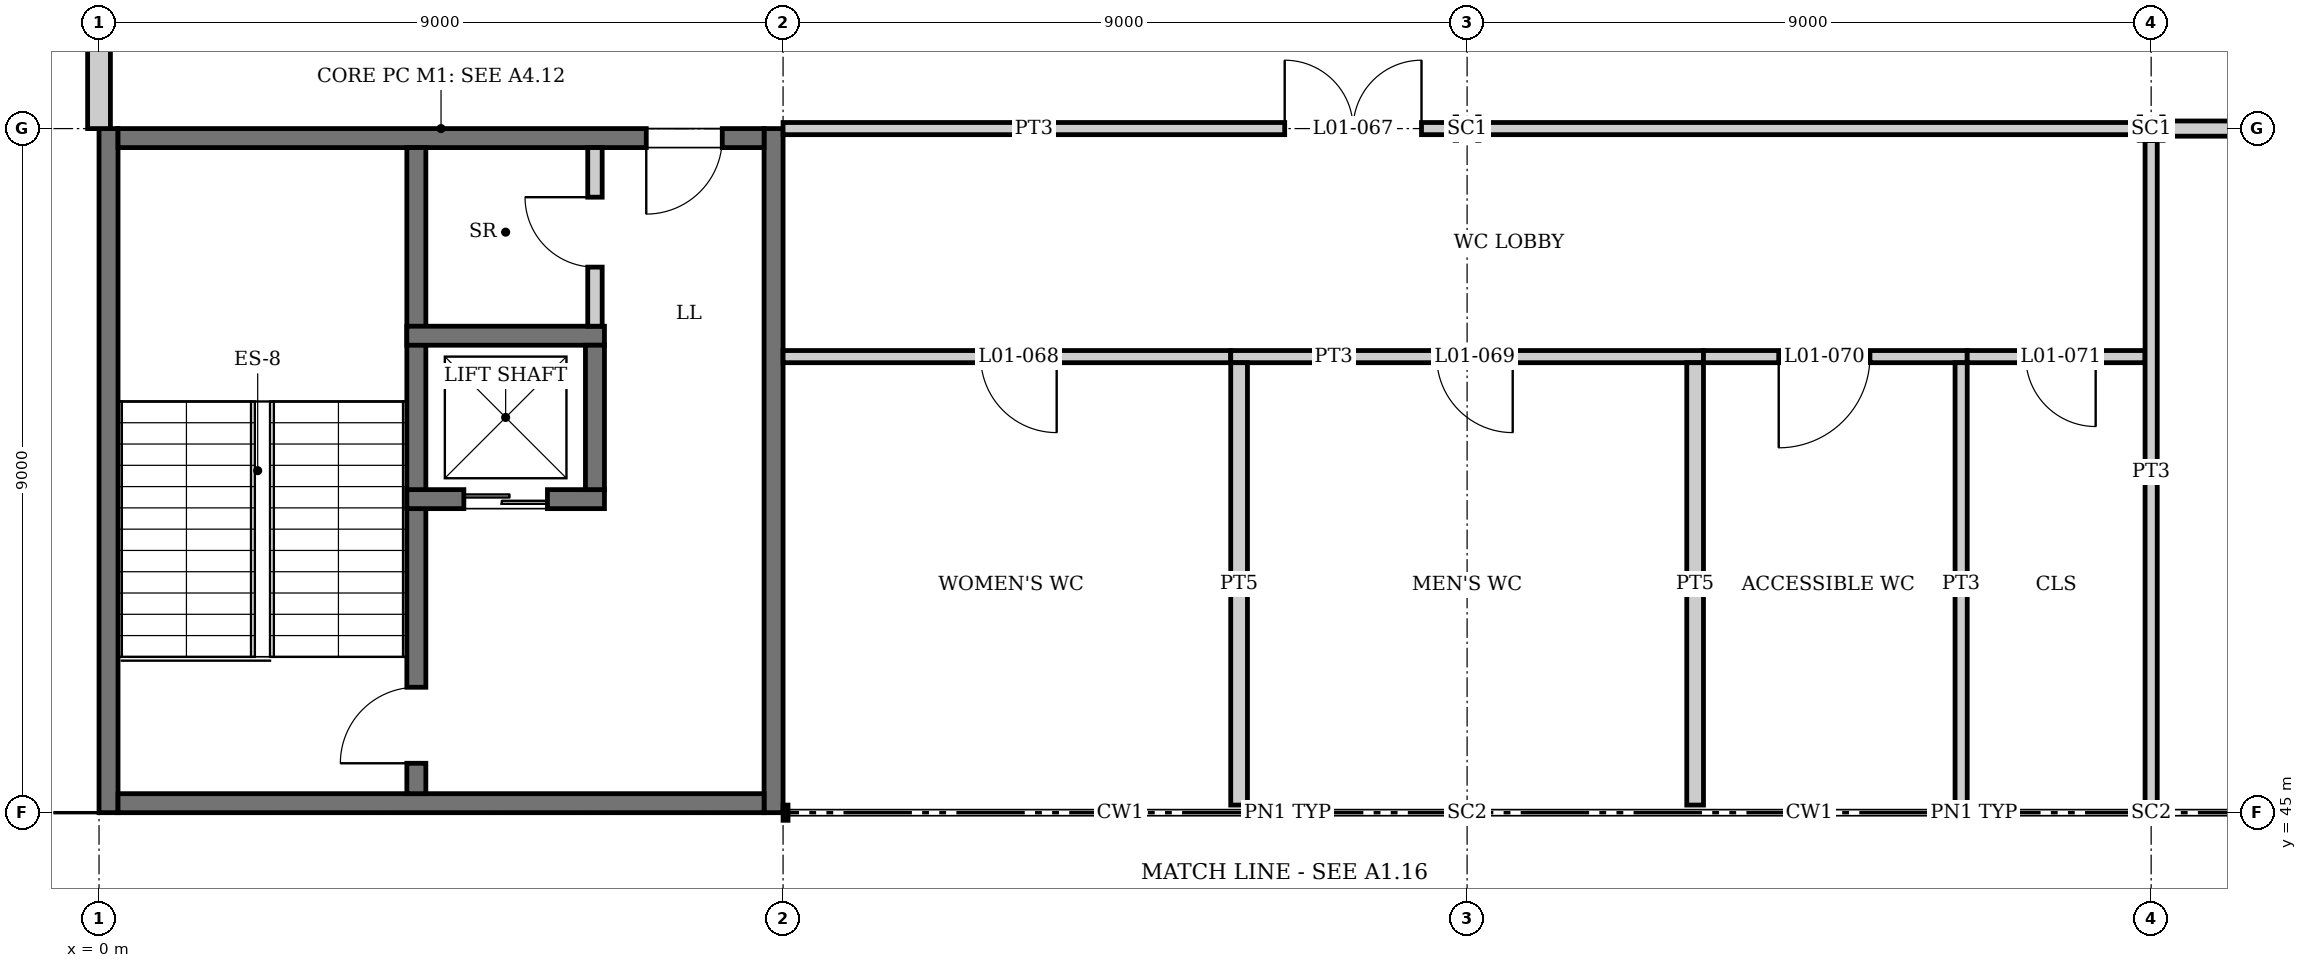
"""IFC4 building model, lengths in metres.
Left out: names, types, materials, properties, quantities, classifications, styles, units other than length and angle.
Written with IfcOpenShell. Run it as: python <this file> out.ifc"""

import sys

from ifc_helpers import new_model, si_unit, direction, frame, frame_2d, origin, origin_2d, place, context, subcontext, project, spatial, rectangle, i_section, extrude, element, fill, save


model = new_model("IFC4")
c1 = context("Model", 3, precision=1e-05, world=origin(), true_north=direction((0.0, 1.0)))
c2 = subcontext(c1, "Body", "Model", "MODEL_VIEW")
j1 = project(units=[si_unit("LENGTHUNIT", "METRE"), si_unit("PLANEANGLEUNIT", "RADIAN")], contexts=[c1])
p1 = place(None, origin())
s1 = spatial("IfcSite", under=j1, at=p1, CompositionType="ELEMENT")
p2 = place(p1, origin())
s2 = spatial("IfcBuilding", under=s1, at=p2, CompositionType="ELEMENT")
p3 = place(p2, frame((0.0, 0.0, 6.0)))
s3 = spatial("IfcBuildingStorey", under=s2, at=p3, CompositionType="ELEMENT", Elevation=6.0)
p4 = place(p3, frame((18.0, 45.0, 0.0), z_axis=(0.0, 0.0, 1.0), x_axis=(0.0, 1.0, 0.0)))
e1 = element("IfcColumn", 1, at=p4, inside=s3, PredefinedType="COLUMN", context=c2, shape_type="SweptSolid", body=[
    extrude(i_section(OverallWidth=0.256, OverallDepth=0.26, WebThickness=0.01, FlangeThickness=0.017, at=origin_2d()), origin(), (0.0, 0.0, 1.0), 4.5),
])
p5 = place(p3, frame((18.0, 54.0, 0.0), z_axis=(0.0, 0.0, 1.0), x_axis=(0.0, 1.0, 0.0)))
e2 = element("IfcColumn", 2, at=p5, inside=s3, PredefinedType="COLUMN", context=c2, shape_type="SweptSolid", body=[
    extrude(i_section(OverallWidth=0.307, OverallDepth=0.315, WebThickness=0.012, FlangeThickness=0.019, at=origin_2d()), origin(), (0.0, 0.0, 1.0), 4.5),
])
p6 = place(p3, frame((27.0, 45.0, 0.0), z_axis=(0.0, 0.0, 1.0), x_axis=(0.0, 1.0, 0.0)))
e3 = element("IfcColumn", 3, at=p6, inside=s3, PredefinedType="COLUMN", context=c2, shape_type="SweptSolid", body=[
    extrude(i_section(OverallWidth=0.256, OverallDepth=0.26, WebThickness=0.01, FlangeThickness=0.017, at=origin_2d()), origin(), (0.0, 0.0, 1.0), 4.5),
])
p7 = place(p3, frame((27.0, 54.0, 0.0), z_axis=(0.0, 0.0, 1.0), x_axis=(0.0, 1.0, 0.0)))
e4 = element("IfcColumn", 4, at=p7, inside=s3, PredefinedType="COLUMN", context=c2, shape_type="SweptSolid", body=[
    extrude(i_section(OverallWidth=0.307, OverallDepth=0.315, WebThickness=0.012, FlangeThickness=0.019, at=origin_2d()), origin(), (0.0, 0.0, 1.0), 4.5),
])
for number, where, z_axis, x_axis in (
    (5, (0.125, 45.0, 0.0), (0.0, 0.0, 1.0), (0.0, 1.0, 0.0)),
    (6, (8.875, 45.0, 0.0), (0.0, 0.0, 1.0), (0.0, 1.0, 0.0)),
):
    element("IfcWall", number, at=place(p3, frame(where, z_axis=z_axis, x_axis=x_axis)), inside=s3, PredefinedType="SHEAR", context=c2, shape_type="SweptSolid", body=[
        extrude(rectangle(XDim=9.0, YDim=0.25, at=frame_2d((4.5, 0.0))), origin(), (0.0, 0.0, 1.0), 4.5),
    ])
p8 = place(p3, frame((0.25, 45.125, 0.0), z_axis=(0.0, 0.0, 1.0), x_axis=(1.0, 0.0, 0.0)))
e7 = element("IfcWall", 7, at=p8, inside=s3, PredefinedType="SHEAR", context=c2, shape_type="SweptSolid", body=[
    extrude(rectangle(XDim=8.5, YDim=0.25, at=frame_2d((4.25, 0.0))), origin(), (0.0, 0.0, 1.0), 4.5),
])
p9 = place(p3, frame((0.25, 53.875, 0.0), z_axis=(0.0, 0.0, 1.0), x_axis=(1.0, 0.0, 0.0)))
e8 = element("IfcWall", 8, at=p9, inside=s3, PredefinedType="SHEAR", context=c2, shape_type="SweptSolid", body=[
    extrude(rectangle(XDim=8.5, YDim=0.25, at=frame_2d((4.25, 0.0))), origin(), (0.0, 0.0, 1.0), 4.5),
])
p10 = place(p9, frame((6.95, 0.0, 0.0)))
e9 = element("IfcOpeningElement", 9, at=p10, cuts=e8, PredefinedType="OPENING", context=c2, shape_type="SweptSolid", body=[
    extrude(rectangle(XDim=1.0, YDim=2.1, at=frame_2d((0.5, 1.05))), frame((0.0, 0.135, 0.0), z_axis=(0.0, -1.0, 0.0), x_axis=(1.0, 0.0, 0.0)), (0.0, 0.0, 1.0), 0.27),
])
p11 = place(p3, frame((0.0, 54.0, 0.0), z_axis=(0.0, 0.0, 1.0), x_axis=(0.0, 1.0, 0.0)))
e10 = element("IfcWall", 10, at=p11, inside=s3, PredefinedType="SOLIDWALL", context=c2, shape_type="SweptSolid", body=[
    extrude(rectangle(XDim=8.872, YDim=0.3, at=frame_2d((4.436, 0.0))), origin(), (0.0, 0.0, 1.0), 3.947),
])
p12 = place(p11, frame((1.8, 0.0, 0.6)))
e11 = element("IfcOpeningElement", 11, at=p12, cuts=e10, PredefinedType="OPENING", context=c2, shape_type="SweptSolid", body=[
    extrude(rectangle(XDim=0.9, YDim=2.7, at=frame_2d((0.45, 1.35))), frame((0.0, 0.16, 0.0), z_axis=(0.0, -1.0, 0.0), x_axis=(1.0, 0.0, 0.0)), (0.0, 0.0, 1.0), 0.32),
])
p13 = place(p11, frame((5.55, 0.0, 0.9)))
e12 = element("IfcOpeningElement", 12, at=p13, cuts=e10, PredefinedType="OPENING", context=c2, shape_type="SweptSolid", body=[
    extrude(rectangle(XDim=2.4, YDim=2.1, at=frame_2d((1.2, 1.05))), frame((0.0, 0.16, 0.0), z_axis=(0.0, -1.0, 0.0), x_axis=(1.0, 0.0, 0.0)), (0.0, 0.0, 1.0), 0.32),
])
p14 = place(p3, frame((4.175, 45.25, 0.0), z_axis=(0.0, 0.0, 1.0), x_axis=(0.0, 1.0, 0.0)))
e13 = element("IfcWall", 13, at=p14, inside=s3, PredefinedType="SOLIDWALL", context=c2, shape_type="SweptSolid", body=[
    extrude(rectangle(XDim=8.5, YDim=0.25, at=frame_2d((4.25, 0.0))), origin(), (0.0, 0.0, 1.0), 4.25),
])
p15 = place(p14, frame((0.4, 0.0, 0.0)))
e14 = element("IfcOpeningElement", 14, at=p15, cuts=e13, PredefinedType="OPENING", context=c2, shape_type="SweptSolid", body=[
    extrude(rectangle(XDim=1.0, YDim=2.1, at=frame_2d((0.5, 1.05))), frame((0.0, 0.135, 0.0), z_axis=(0.0, -1.0, 0.0), x_axis=(1.0, 0.0, 0.0)), (0.0, 0.0, 1.0), 0.27),
])
p16 = place(p3, frame((4.05, 49.125, 0.0), z_axis=(0.0, 0.0, 1.0), x_axis=(1.0, 0.0, 0.0)))
e15 = element("IfcWall", 15, at=p16, inside=s3, PredefinedType="SOLIDWALL", context=c2, shape_type="SweptSolid", body=[
    extrude(rectangle(XDim=2.6, YDim=0.25, at=frame_2d((1.3, 0.0))), origin(), (0.0, 0.0, 1.0), 4.5),
])
p17 = place(p16, frame((0.75, 0.0, 0.0)))
e16 = element("IfcOpeningElement", 16, at=p17, cuts=e15, PredefinedType="OPENING", context=c2, shape_type="SweptSolid", body=[
    extrude(rectangle(XDim=1.1, YDim=2.1, at=frame_2d((0.55, 1.05))), frame((0.0, 0.135, 0.0), z_axis=(0.0, -1.0, 0.0), x_axis=(1.0, 0.0, 0.0)), (0.0, 0.0, 1.0), 0.27),
])
p18 = place(p3, frame((4.05, 51.275, 0.0), z_axis=(0.0, 0.0, 1.0), x_axis=(1.0, 0.0, 0.0)))
e17 = element("IfcWall", 17, at=p18, inside=s3, PredefinedType="SOLIDWALL", context=c2, shape_type="SweptSolid", body=[
    extrude(rectangle(XDim=2.6, YDim=0.25, at=frame_2d((1.3, 0.0))), origin(), (0.0, 0.0, 1.0), 4.5),
])
p19 = place(p3, frame((6.525, 49.25, 0.0), z_axis=(0.0, 0.0, 1.0), x_axis=(0.0, 1.0, 0.0)))
e18 = element("IfcWall", 18, at=p19, inside=s3, PredefinedType="SOLIDWALL", context=c2, shape_type="SweptSolid", body=[
    extrude(rectangle(XDim=1.9, YDim=0.25, at=frame_2d((0.95, 0.0))), origin(), (0.0, 0.0, 1.0), 4.5),
])
p20 = place(p3, frame((9.0, 51.0, 0.0), z_axis=(0.0, 0.0, 1.0), x_axis=(1.0, 0.0, 0.0)))
e19 = element("IfcWall", 19, at=p20, inside=s3, PredefinedType="PARTITIONING", context=c2, shape_type="SweptSolid", body=[
    extrude(rectangle(XDim=5.89, YDim=0.16, at=frame_2d((2.945, 0.0))), origin(), (0.0, 0.0, 1.0), 3.994),
])
p21 = place(p20, frame((2.6, 0.0, 0.0)))
e20 = element("IfcOpeningElement", 20, at=p21, cuts=e19, PredefinedType="OPENING", context=c2, shape_type="SweptSolid", body=[
    extrude(rectangle(XDim=1.0, YDim=2.1, at=frame_2d((0.5, 1.05))), frame((0.0, 0.09, 0.0), z_axis=(0.0, -1.0, 0.0), x_axis=(1.0, 0.0, 0.0)), (0.0, 0.0, 1.0), 0.18),
])
p22 = place(p3, frame((14.89, 51.0, 0.0), z_axis=(0.0, 0.0, 1.0), x_axis=(1.0, 0.0, 0.0)))
e21 = element("IfcWall", 21, at=p22, inside=s3, PredefinedType="PARTITIONING", context=c2, shape_type="SweptSolid", body=[
    extrude(rectangle(XDim=6.22, YDim=0.16, at=frame_2d((3.11, 0.0))), origin(), (0.0, 0.0, 1.0), 3.947),
])
p23 = place(p22, frame((2.71, 0.0, 0.0)))
e22 = element("IfcOpeningElement", 22, at=p23, cuts=e21, PredefinedType="OPENING", context=c2, shape_type="SweptSolid", body=[
    extrude(rectangle(XDim=1.0, YDim=2.1, at=frame_2d((0.5, 1.05))), frame((0.0, 0.09, 0.0), z_axis=(0.0, -1.0, 0.0), x_axis=(1.0, 0.0, 0.0)), (0.0, 0.0, 1.0), 0.18),
])
p24 = place(p3, frame((21.11, 51.0, 0.0), z_axis=(0.0, 0.0, 1.0), x_axis=(1.0, 0.0, 0.0)))
e23 = element("IfcWall", 23, at=p24, inside=s3, PredefinedType="PARTITIONING", context=c2, shape_type="SweptSolid", body=[
    extrude(rectangle(XDim=3.47, YDim=0.16, at=frame_2d((1.735, 0.0))), origin(), (0.0, 0.0, 1.0), 3.994),
])
p25 = place(p24, frame((0.99, 0.0, 0.0)))
e24 = element("IfcOpeningElement", 24, at=p25, cuts=e23, PredefinedType="OPENING", context=c2, shape_type="SweptSolid", body=[
    extrude(rectangle(XDim=1.2, YDim=2.1, at=frame_2d((0.6, 1.05))), frame((0.0, 0.09, 0.0), z_axis=(0.0, -1.0, 0.0), x_axis=(1.0, 0.0, 0.0)), (0.0, 0.0, 1.0), 0.18),
])
p26 = place(p3, frame((24.58, 51.0, 0.0), z_axis=(0.0, 0.0, 1.0), x_axis=(1.0, 0.0, 0.0)))
e25 = element("IfcWall", 25, at=p26, inside=s3, PredefinedType="PARTITIONING", context=c2, shape_type="SweptSolid", body=[
    extrude(rectangle(XDim=2.34, YDim=0.16, at=frame_2d((1.17, 0.0))), origin(), (0.0, 0.0, 1.0), 3.947),
])
p27 = place(p26, frame((0.77, 0.0, 0.0)))
e26 = element("IfcOpeningElement", 26, at=p27, cuts=e25, PredefinedType="OPENING", context=c2, shape_type="SweptSolid", body=[
    extrude(rectangle(XDim=0.92, YDim=2.1, at=frame_2d((0.46, 1.05))), frame((0.0, 0.09, 0.0), z_axis=(0.0, -1.0, 0.0), x_axis=(1.0, 0.0, 0.0)), (0.0, 0.0, 1.0), 0.18),
])
p28 = place(p3, frame((9.0, 54.0, 0.0), z_axis=(0.0, 0.0, 1.0), x_axis=(1.0, 0.0, 0.0)))
e27 = element("IfcWall", 27, at=p28, inside=s3, PredefinedType="PARTITIONING", context=c2, shape_type="SweptSolid", body=[
    extrude(rectangle(XDim=8.843, YDim=0.16, at=frame_2d((4.421, 0.0))), origin(), (0.0, 0.0, 1.0), 3.822),
])
p29 = place(p28, frame((6.6, 0.0, 0.0)))
e28 = element("IfcOpeningElement", 28, at=p29, cuts=e27, PredefinedType="OPENING", context=c2, shape_type="SweptSolid", body=[
    extrude(rectangle(XDim=1.8, YDim=2.1, at=frame_2d((0.9, 1.05))), frame((0.0, 0.09, 0.0), z_axis=(0.0, -1.0, 0.0), x_axis=(1.0, 0.0, 0.0)), (0.0, 0.0, 1.0), 0.18),
])
p30 = place(p3, frame((18.157, 54.0, 0.0), z_axis=(0.0, 0.0, 1.0), x_axis=(1.0, 0.0, 0.0)))
e29 = element("IfcWall", 29, at=p30, inside=s3, PredefinedType="PARTITIONING", context=c2, shape_type="SweptSolid", body=[
    extrude(rectangle(XDim=8.685, YDim=0.16, at=frame_2d((4.343, 0.0))), origin(), (0.0, 0.0, 1.0), 3.822),
])
p31 = place(p3, frame((27.157, 54.0, 0.0), z_axis=(0.0, 0.0, 1.0), x_axis=(1.0, 0.0, 0.0)))
e30 = element("IfcWall", 30, at=p31, inside=s3, PredefinedType="PARTITIONING", context=c2, shape_type="SweptSolid", body=[
    extrude(rectangle(XDim=8.685, YDim=0.2, at=frame_2d((4.343, 0.0))), origin(), (0.0, 0.0, 1.0), 3.822),
])
p32 = place(p31, frame((3.942, 0.0, 0.0)))
e31 = element("IfcOpeningElement", 31, at=p32, cuts=e30, PredefinedType="OPENING", context=c2, shape_type="SweptSolid", body=[
    extrude(rectangle(XDim=1.0, YDim=2.1, at=frame_2d((0.5, 1.05))), frame((0.0, 0.11, 0.0), z_axis=(0.0, -1.0, 0.0), x_axis=(1.0, 0.0, 0.0)), (0.0, 0.0, 1.0), 0.22),
])
p33 = place(p3, frame((6.525, 51.4, 0.0), z_axis=(0.0, 0.0, 1.0), x_axis=(0.0, 1.0, 0.0)))
e32 = element("IfcWall", 32, at=p33, inside=s3, PredefinedType="PARTITIONING", context=c2, shape_type="SweptSolid", body=[
    extrude(rectangle(XDim=2.35, YDim=0.19, at=frame_2d((1.175, 0.0))), origin(), (0.0, 0.0, 1.0), 4.25),
])
p34 = place(p33, frame((0.778, 0.0, 0.0)))
e33 = element("IfcOpeningElement", 33, at=p34, cuts=e32, PredefinedType="OPENING", context=c2, shape_type="SweptSolid", body=[
    extrude(rectangle(XDim=0.92, YDim=2.1, at=frame_2d((0.46, 1.05))), frame((0.0, 0.105, 0.0), z_axis=(0.0, -1.0, 0.0), x_axis=(1.0, 0.0, 0.0)), (0.0, 0.0, 1.0), 0.21),
])
for number, where, z_axis, x_axis in (
    (34, (15.0, 45.1, 0.0), (0.0, 0.0, 1.0), (0.0, 1.0, 0.0)),
    (35, (21.0, 45.1, 0.0), (0.0, 0.0, 1.0), (0.0, 1.0, 0.0)),
):
    element("IfcWall", number, at=place(p3, frame(where, z_axis=z_axis, x_axis=x_axis)), inside=s3, PredefinedType="PLUMBINGWALL", context=c2, shape_type="SweptSolid", body=[
        extrude(rectangle(XDim=5.82, YDim=0.22, at=frame_2d((2.91, 0.0))), origin(), (0.0, 0.0, 1.0), 4.35),
    ])
p35 = place(p3, frame((24.5, 45.1, 0.0), z_axis=(0.0, 0.0, 1.0), x_axis=(0.0, 1.0, 0.0)))
e36 = element("IfcWall", 36, at=p35, inside=s3, PredefinedType="PARTITIONING", context=c2, shape_type="SweptSolid", body=[
    extrude(rectangle(XDim=5.82, YDim=0.16, at=frame_2d((2.91, 0.0))), origin(), (0.0, 0.0, 1.0), 4.35),
])
p36 = place(p3, frame((27.0, 45.13, 0.0), z_axis=(0.0, 0.0, 1.0), x_axis=(0.0, 1.0, 0.0)))
e37 = element("IfcWall", 37, at=p36, inside=s3, PredefinedType="PARTITIONING", context=c2, shape_type="SweptSolid", body=[
    extrude(rectangle(XDim=8.713, YDim=0.16, at=frame_2d((4.356, 0.0))), origin(), (0.0, 0.0, 1.0), 3.947),
])
p37 = place(p17, origin())
e38 = element("IfcDoor", 38, at=p37, inside=s3, OperationType="DOUBLE_DOOR_SLIDING", PredefinedType="DOOR", context=c2, shape_type="SweptSolid", body=[
    extrude(rectangle(XDim=1.1, YDim=2.1, at=frame_2d((0.55, 1.05))), frame((0.0, 0.025, 0.0), z_axis=(0.0, -1.0, 0.0), x_axis=(1.0, 0.0, 0.0)), (0.0, 0.0, 1.0), 0.05),
])
fill(e16, e38)
p38 = place(p15, origin())
e39 = element("IfcDoor", 39, at=p38, inside=s3, OperationType="SINGLE_SWING_LEFT", PredefinedType="DOOR", context=c2, shape_type="SweptSolid", body=[
    extrude(rectangle(XDim=1.0, YDim=2.1, at=frame_2d((0.5, 1.05))), frame((0.0, 0.025, 0.0), z_axis=(0.0, -1.0, 0.0), x_axis=(1.0, 0.0, 0.0)), (0.0, 0.0, 1.0), 0.05),
])
fill(e14, e39)
p39 = place(p10, frame((1.0, 0.0, 0.0), z_axis=(0.0, 0.0, 1.0), x_axis=(-1.0, 0.0, 0.0)))
e40 = element("IfcDoor", 40, at=p39, inside=s3, OperationType="SINGLE_SWING_RIGHT", PredefinedType="DOOR", context=c2, shape_type="SweptSolid", body=[
    extrude(rectangle(XDim=1.0, YDim=2.1, at=frame_2d((0.5, 1.05))), frame((0.0, 0.025, 0.0), z_axis=(0.0, -1.0, 0.0), x_axis=(1.0, 0.0, 0.0)), (0.0, 0.0, 1.0), 0.05),
])
fill(e9, e40)
p40 = place(p34, origin())
e41 = element("IfcDoor", 41, at=p40, inside=s3, OperationType="SINGLE_SWING_RIGHT", PredefinedType="DOOR", context=c2, shape_type="SweptSolid", body=[
    extrude(rectangle(XDim=0.92, YDim=2.1, at=frame_2d((0.46, 1.05))), frame((0.0, 0.025, 0.0), z_axis=(0.0, -1.0, 0.0), x_axis=(1.0, 0.0, 0.0)), (0.0, 0.0, 1.0), 0.05),
])
fill(e33, e41)
p41 = place(p29, origin())
e42 = element("IfcDoor", 42, at=p41, inside=s3, OperationType="DOUBLE_DOOR_SINGLE_SWING", PredefinedType="DOOR", context=c2, shape_type="SweptSolid", body=[
    extrude(rectangle(XDim=1.8, YDim=2.1, at=frame_2d((0.9, 1.05))), frame((0.0, 0.025, 0.0), z_axis=(0.0, -1.0, 0.0), x_axis=(1.0, 0.0, 0.0)), (0.0, 0.0, 1.0), 0.05),
])
fill(e28, e42)
p42 = place(p21, frame((1.0, 0.0, 0.0), z_axis=(0.0, 0.0, 1.0), x_axis=(-1.0, 0.0, 0.0)))
e43 = element("IfcDoor", 43, at=p42, inside=s3, OperationType="SINGLE_SWING_LEFT", PredefinedType="DOOR", context=c2, shape_type="SweptSolid", body=[
    extrude(rectangle(XDim=1.0, YDim=2.1, at=frame_2d((0.5, 1.05))), frame((0.0, 0.025, 0.0), z_axis=(0.0, -1.0, 0.0), x_axis=(1.0, 0.0, 0.0)), (0.0, 0.0, 1.0), 0.05),
])
fill(e20, e43)
p43 = place(p23, frame((1.0, 0.0, 0.0), z_axis=(0.0, 0.0, 1.0), x_axis=(-1.0, 0.0, 0.0)))
e44 = element("IfcDoor", 44, at=p43, inside=s3, OperationType="SINGLE_SWING_LEFT", PredefinedType="DOOR", context=c2, shape_type="SweptSolid", body=[
    extrude(rectangle(XDim=1.0, YDim=2.1, at=frame_2d((0.5, 1.05))), frame((0.0, 0.025, 0.0), z_axis=(0.0, -1.0, 0.0), x_axis=(1.0, 0.0, 0.0)), (0.0, 0.0, 1.0), 0.05),
])
fill(e22, e44)
p44 = place(p25, frame((1.2, 0.0, 0.0), z_axis=(0.0, 0.0, 1.0), x_axis=(-1.0, 0.0, 0.0)))
e45 = element("IfcDoor", 45, at=p44, inside=s3, OperationType="SINGLE_SWING_RIGHT", PredefinedType="DOOR", context=c2, shape_type="SweptSolid", body=[
    extrude(rectangle(XDim=1.2, YDim=2.1, at=frame_2d((0.6, 1.05))), frame((0.0, 0.025, 0.0), z_axis=(0.0, -1.0, 0.0), x_axis=(1.0, 0.0, 0.0)), (0.0, 0.0, 1.0), 0.05),
])
fill(e24, e45)
p45 = place(p27, frame((0.92, 0.0, 0.0), z_axis=(0.0, 0.0, 1.0), x_axis=(-1.0, 0.0, 0.0)))
e46 = element("IfcDoor", 46, at=p45, inside=s3, OperationType="SINGLE_SWING_LEFT", PredefinedType="DOOR", context=c2, shape_type="SweptSolid", body=[
    extrude(rectangle(XDim=0.92, YDim=2.1, at=frame_2d((0.46, 1.05))), frame((0.0, 0.025, 0.0), z_axis=(0.0, -1.0, 0.0), x_axis=(1.0, 0.0, 0.0)), (0.0, 0.0, 1.0), 0.05),
])
fill(e26, e46)
save(model, sys.argv[1])
